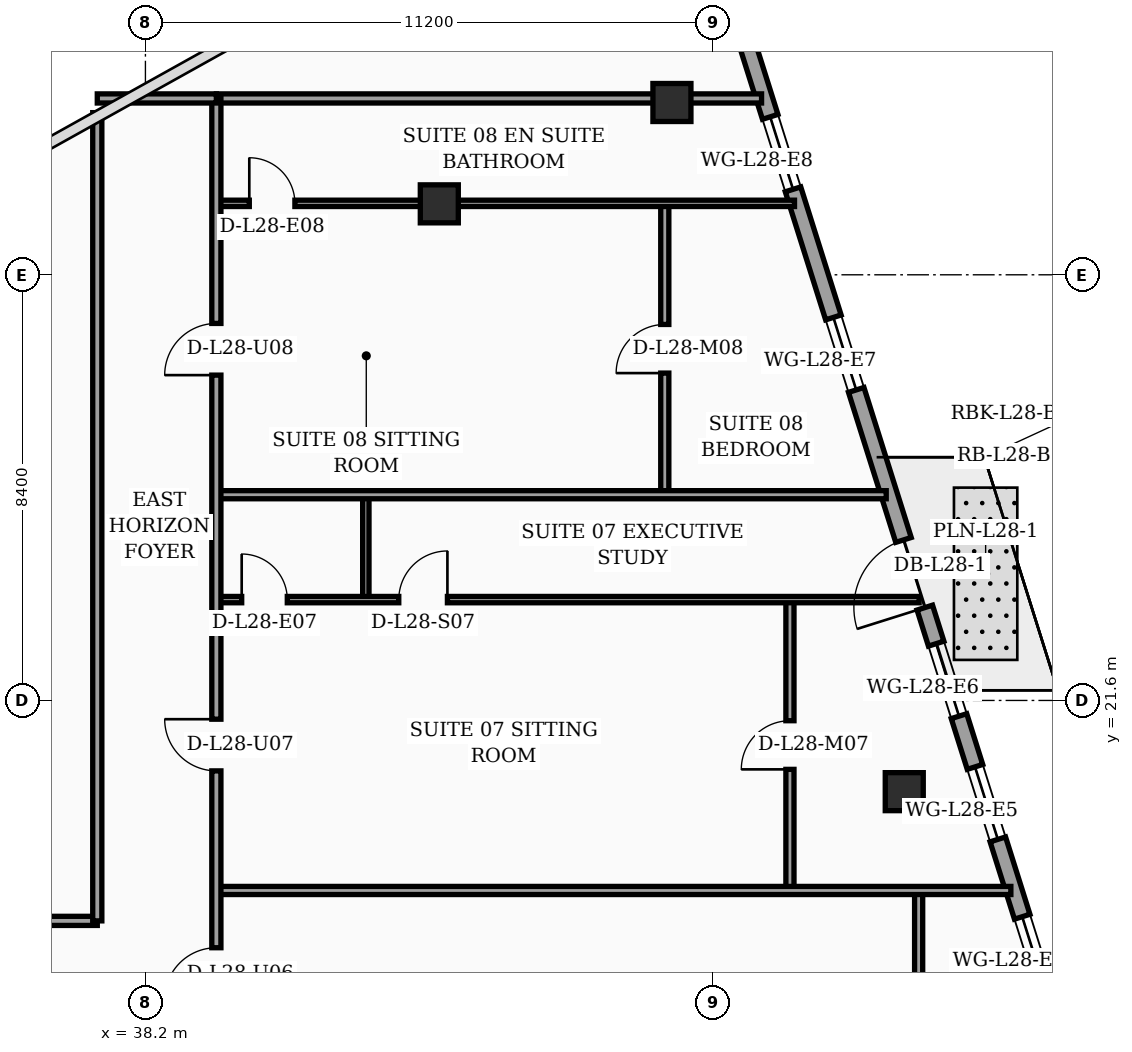
"""IFC4 building model, lengths in metres.
Left out: names, types, materials, properties, quantities, classifications, styles, units other than length and angle.
Written with IfcOpenShell. Run it as: python <this file> out.ifc"""

import sys

from ifc_helpers import new_model, si_unit, direction, frame, frame_2d, origin, origin_2d, place, context, subcontext, project, spatial, rectangle, hollow_rectangle, extrude, element, fill, save


model = new_model("IFC4")
c1 = context("Model", 3, precision=1e-05, world=origin(), true_north=direction((0.0, 1.0)))
c2 = subcontext(c1, "Body", "Model", "MODEL_VIEW")
j1 = project(units=[si_unit("LENGTHUNIT", "METRE"), si_unit("PLANEANGLEUNIT", "RADIAN")], contexts=[c1])
p1 = place(None, origin())
s1 = spatial("IfcSite", under=j1, at=p1, CompositionType="ELEMENT")
p2 = place(p1, origin())
s2 = spatial("IfcBuilding", under=s1, at=p2, CompositionType="ELEMENT")
p3 = place(p2, frame((0.0, 0.0, 116.4)))
s3 = spatial("IfcBuildingStorey", under=s2, at=p3, CompositionType="ELEMENT", Elevation=116.4)
for number, where, z_axis, x_axis in (
    (1, (44.0, 31.4, 0.0), (0.0, 0.0, 1.0), (1.0, 0.0, 0.0)),
    (2, (53.176, 19.8, 0.0), (0.0, 0.0, 1.0), (1.0, 0.0, 0.0)),
    (3, (48.591, 33.4, 0.0), (0.0, 0.0, 1.0), (1.0, 0.0, 0.0)),
):
    element("IfcColumn", number, at=place(p3, frame(where, z_axis=z_axis, x_axis=x_axis)), inside=s3, PredefinedType="COLUMN", context=c2, shape_type="SweptSolid", body=[
        extrude(hollow_rectangle(XDim=0.75, YDim=0.75, WallThickness=0.032, at=origin_2d()), origin(), (0.0, 0.0, 1.0), 3.56),
    ])
p4 = place(p3, frame((59.23, 5.505, 0.0), z_axis=(0.0, 0.0, 1.0), x_axis=(-0.300509063924, 0.953778958931, 0.0)))
e4 = element("IfcWall", 4, at=p4, inside=s3, PredefinedType="SOLIDWALL", context=c2, shape_type="SweptSolid", body=[
    extrude(rectangle(XDim=30.814, YDim=0.32, at=frame_2d((15.407, 0.0))), origin(), (0.0, 0.0, 1.0), 3.56),
])
p5 = place(p4, frame((18.796, 0.0, 0.0)))
e5 = element("IfcOpeningElement", 5, at=p5, cuts=e4, PredefinedType="OPENING", context=c2, shape_type="SweptSolid", body=[
    extrude(rectangle(XDim=1.4, YDim=2.25, at=frame_2d((0.7, 1.125))), frame((0.0, 0.17, 0.0), z_axis=(0.0, -1.0, 0.0), x_axis=(1.0, 0.0, 0.0)), (0.0, 0.0, 1.0), 0.34),
])
p6 = place(p4, frame((2.65, 0.0, 0.75)))
e6 = element("IfcOpeningElement", 6, at=p6, cuts=e4, PredefinedType="OPENING", context=c2, shape_type="SweptSolid", body=[
    extrude(rectangle(XDim=1.5, YDim=1.6, at=frame_2d((0.75, 0.8))), frame((0.0, 0.17, 0.0), z_axis=(0.0, -1.0, 0.0), x_axis=(1.0, 0.0, 0.0)), (0.0, 0.0, 1.0), 0.34),
])
p7 = place(p4, frame((4.7, 0.0, 0.75)))
e7 = element("IfcOpeningElement", 7, at=p7, cuts=e4, PredefinedType="OPENING", context=c2, shape_type="SweptSolid", body=[
    extrude(rectangle(XDim=1.5, YDim=1.6, at=frame_2d((0.75, 0.8))), frame((0.0, 0.17, 0.0), z_axis=(0.0, -1.0, 0.0), x_axis=(1.0, 0.0, 0.0)), (0.0, 0.0, 1.0), 0.34),
])
p8 = place(p4, frame((7.8, 0.0, 0.75)))
e8 = element("IfcOpeningElement", 8, at=p8, cuts=e4, PredefinedType="OPENING", context=c2, shape_type="SweptSolid", body=[
    extrude(rectangle(XDim=1.5, YDim=1.6, at=frame_2d((0.75, 0.8))), frame((0.0, 0.17, 0.0), z_axis=(0.0, -1.0, 0.0), x_axis=(1.0, 0.0, 0.0)), (0.0, 0.0, 1.0), 0.34),
])
p9 = place(p4, frame((10.9, 0.0, 0.75)))
e9 = element("IfcOpeningElement", 9, at=p9, cuts=e4, PredefinedType="OPENING", context=c2, shape_type="SweptSolid", body=[
    extrude(rectangle(XDim=1.5, YDim=1.6, at=frame_2d((0.75, 0.8))), frame((0.0, 0.17, 0.0), z_axis=(0.0, -1.0, 0.0), x_axis=(1.0, 0.0, 0.0)), (0.0, 0.0, 1.0), 0.34),
])
p10 = place(p4, frame((14.0, 0.0, 0.75)))
e10 = element("IfcOpeningElement", 10, at=p10, cuts=e4, PredefinedType="OPENING", context=c2, shape_type="SweptSolid", body=[
    extrude(rectangle(XDim=1.5, YDim=1.6, at=frame_2d((0.75, 0.8))), frame((0.0, 0.17, 0.0), z_axis=(0.0, -1.0, 0.0), x_axis=(1.0, 0.0, 0.0)), (0.0, 0.0, 1.0), 0.34),
])
p11 = place(p4, frame((16.55, 0.0, 0.75)))
e11 = element("IfcOpeningElement", 11, at=p11, cuts=e4, PredefinedType="OPENING", context=c2, shape_type="SweptSolid", body=[
    extrude(rectangle(XDim=1.5, YDim=1.6, at=frame_2d((0.75, 0.8))), frame((0.0, 0.17, 0.0), z_axis=(0.0, -1.0, 0.0), x_axis=(1.0, 0.0, 0.0)), (0.0, 0.0, 1.0), 0.34),
])
p12 = place(p4, frame((23.3, 0.0, 0.75)))
e12 = element("IfcOpeningElement", 12, at=p12, cuts=e4, PredefinedType="OPENING", context=c2, shape_type="SweptSolid", body=[
    extrude(rectangle(XDim=1.5, YDim=1.6, at=frame_2d((0.75, 0.8))), frame((0.0, 0.17, 0.0), z_axis=(0.0, -1.0, 0.0), x_axis=(1.0, 0.0, 0.0)), (0.0, 0.0, 1.0), 0.34),
])
p13 = place(p4, frame((27.45, 0.0, 0.75)))
e13 = element("IfcOpeningElement", 13, at=p13, cuts=e4, PredefinedType="OPENING", context=c2, shape_type="SweptSolid", body=[
    extrude(rectangle(XDim=1.5, YDim=1.6, at=frame_2d((0.75, 0.8))), frame((0.0, 0.17, 0.0), z_axis=(0.0, -1.0, 0.0), x_axis=(1.0, 0.0, 0.0)), (0.0, 0.0, 1.0), 0.34),
])
p14 = place(p3, frame((21.5, 17.25, 0.0), z_axis=(0.0, 0.0, 1.0), x_axis=(1.0, 0.0, 0.0)))
e14 = element("IfcWall", 14, at=p14, inside=s3, PredefinedType="PARTITIONING", context=c2, shape_type="SweptSolid", body=[
    extrude(rectangle(XDim=15.75, YDim=0.18, at=frame_2d((7.875, 0.0))), origin(), (0.0, 0.0, 1.0), 2.84),
])
p15 = place(p14, frame((0.95, 0.0, 0.0)))
e15 = element("IfcOpeningElement", 15, at=p15, cuts=e14, PredefinedType="OPENING", context=c2, shape_type="SweptSolid", body=[
    extrude(rectangle(XDim=1.02, YDim=2.2, at=frame_2d((0.51, 1.1))), frame((0.0, 0.1, 0.0), z_axis=(0.0, -1.0, 0.0), x_axis=(1.0, 0.0, 0.0)), (0.0, 0.0, 1.0), 0.2),
])
p16 = place(p14, frame((6.82, 0.0, 0.0)))
e16 = element("IfcOpeningElement", 16, at=p16, cuts=e14, PredefinedType="OPENING", context=c2, shape_type="SweptSolid", body=[
    extrude(rectangle(XDim=1.02, YDim=2.2, at=frame_2d((0.51, 1.1))), frame((0.0, 0.1, 0.0), z_axis=(0.0, -1.0, 0.0), x_axis=(1.0, 0.0, 0.0)), (0.0, 0.0, 1.0), 0.2),
])
p17 = place(p14, frame((11.38, 0.0, 0.0)))
e17 = element("IfcOpeningElement", 17, at=p17, cuts=e14, PredefinedType="OPENING", context=c2, shape_type="SweptSolid", body=[
    extrude(rectangle(XDim=1.02, YDim=2.2, at=frame_2d((0.51, 1.1))), frame((0.0, 0.1, 0.0), z_axis=(0.0, -1.0, 0.0), x_axis=(1.0, 0.0, 0.0)), (0.0, 0.0, 1.0), 0.2),
])
p18 = place(p3, frame((37.25, 17.25, 0.0), z_axis=(0.0, 0.0, 1.0), x_axis=(0.0, 1.0, 0.0)))
e18 = element("IfcWall", 18, at=p18, inside=s3, PredefinedType="PARTITIONING", context=c2, shape_type="SweptSolid", body=[
    extrude(rectangle(XDim=15.95, YDim=0.18, at=frame_2d((7.975, 0.0))), origin(), (0.0, 0.0, 1.0), 2.84),
])
p19 = place(p3, frame((53.46, 7.45, 0.0), z_axis=(0.0, 0.0, 1.0), x_axis=(0.0, 1.0, 0.0)))
e19 = element("IfcWall", 19, at=p19, inside=s3, PredefinedType="PARTITIONING", context=c2, shape_type="SweptSolid", body=[
    extrude(rectangle(XDim=10.4, YDim=0.16, at=frame_2d((5.2, 0.0))), origin(), (0.0, 0.0, 1.0), 3.04),
])
p20 = place(p19, frame((4.72, 0.0, 0.0)))
e20 = element("IfcOpeningElement", 20, at=p20, cuts=e19, PredefinedType="OPENING", context=c2, shape_type="SweptSolid", body=[
    extrude(rectangle(XDim=0.96, YDim=2.2, at=frame_2d((0.48, 1.1))), frame((0.0, 0.09, 0.0), z_axis=(0.0, -1.0, 0.0), x_axis=(1.0, 0.0, 0.0)), (0.0, 0.0, 1.0), 0.18),
])
p21 = place(p3, frame((42.55, 23.59, 0.0), z_axis=(0.0, 0.0, 1.0), x_axis=(0.0, 1.0, 0.0)))
e21 = element("IfcWall", 21, at=p21, inside=s3, PredefinedType="PARTITIONING", context=c2, shape_type="SweptSolid", body=[
    extrude(rectangle(XDim=2.07, YDim=0.125, at=frame_2d((1.035, 0.0))), origin(), (0.0, 0.0, 1.0), 3.19),
])
p22 = place(p3, frame((50.92, 17.85, 0.0), z_axis=(0.0, 0.0, 1.0), x_axis=(0.0, 1.0, 0.0)))
e22 = element("IfcWall", 22, at=p22, inside=s3, PredefinedType="PARTITIONING", context=c2, shape_type="SweptSolid", body=[
    extrude(rectangle(XDim=5.74, YDim=0.16, at=frame_2d((2.87, 0.0))), origin(), (0.0, 0.0, 1.0), 2.84),
])
p23 = place(p22, frame((2.39, 0.0, 0.0)))
e23 = element("IfcOpeningElement", 23, at=p23, cuts=e22, PredefinedType="OPENING", context=c2, shape_type="SweptSolid", body=[
    extrude(rectangle(XDim=0.96, YDim=2.2, at=frame_2d((0.48, 1.1))), frame((0.0, 0.09, 0.0), z_axis=(0.0, -1.0, 0.0), x_axis=(1.0, 0.0, 0.0)), (0.0, 0.0, 1.0), 0.18),
])
p24 = place(p3, frame((39.6, 23.59, 0.0), z_axis=(0.0, 0.0, 1.0), x_axis=(1.0, 0.0, 0.0)))
e24 = element("IfcWall", 24, at=p24, inside=s3, PredefinedType="PARTITIONING", context=c2, shape_type="SweptSolid", body=[
    extrude(rectangle(XDim=13.87, YDim=0.125, at=frame_2d((6.935, 0.0))), origin(), (0.0, 0.0, 1.0), 2.84),
])
p25 = place(p24, frame((0.5, 0.0, 0.0)))
e25 = element("IfcOpeningElement", 25, at=p25, cuts=e24, PredefinedType="OPENING", context=c2, shape_type="SweptSolid", body=[
    extrude(rectangle(XDim=0.9, YDim=2.15, at=frame_2d((0.45, 1.075))), frame((0.0, 0.073, 0.0), z_axis=(0.0, -1.0, 0.0), x_axis=(1.0, 0.0, 0.0)), (0.0, 0.0, 1.0), 0.145),
])
p26 = place(p24, frame((3.6, 0.0, 0.0)))
e26 = element("IfcOpeningElement", 26, at=p26, cuts=e24, PredefinedType="OPENING", context=c2, shape_type="SweptSolid", body=[
    extrude(rectangle(XDim=0.96, YDim=2.2, at=frame_2d((0.48, 1.1))), frame((0.0, 0.073, 0.0), z_axis=(0.0, -1.0, 0.0), x_axis=(1.0, 0.0, 0.0)), (0.0, 0.0, 1.0), 0.145),
])
p27 = place(p3, frame((48.45, 25.66, 0.0), z_axis=(0.0, 0.0, 1.0), x_axis=(0.0, 1.0, 0.0)))
e27 = element("IfcWall", 27, at=p27, inside=s3, PredefinedType="PARTITIONING", context=c2, shape_type="SweptSolid", body=[
    extrude(rectangle(XDim=5.75, YDim=0.16, at=frame_2d((2.875, 0.0))), origin(), (0.0, 0.0, 1.0), 3.56),
])
p28 = place(p27, frame((2.4, 0.0, 0.0)))
e28 = element("IfcOpeningElement", 28, at=p28, cuts=e27, PredefinedType="OPENING", context=c2, shape_type="SweptSolid", body=[
    extrude(rectangle(XDim=0.96, YDim=2.2, at=frame_2d((0.48, 1.1))), frame((0.0, 0.09, 0.0), z_axis=(0.0, -1.0, 0.0), x_axis=(1.0, 0.0, 0.0)), (0.0, 0.0, 1.0), 0.18),
])
p29 = place(p3, frame((39.6, 31.41, 0.0), z_axis=(0.0, 0.0, 1.0), x_axis=(1.0, 0.0, 0.0)))
e29 = element("IfcWall", 29, at=p29, inside=s3, PredefinedType="PARTITIONING", context=c2, shape_type="SweptSolid", body=[
    extrude(rectangle(XDim=11.41, YDim=0.125, at=frame_2d((5.705, 0.0))), origin(), (0.0, 0.0, 1.0), 2.84),
])
p30 = place(p29, frame((0.65, 0.0, 0.0)))
e30 = element("IfcOpeningElement", 30, at=p30, cuts=e29, PredefinedType="OPENING", context=c2, shape_type="SweptSolid", body=[
    extrude(rectangle(XDim=0.9, YDim=2.15, at=frame_2d((0.45, 1.075))), frame((0.0, 0.073, 0.0), z_axis=(0.0, -1.0, 0.0), x_axis=(1.0, 0.0, 0.0)), (0.0, 0.0, 1.0), 0.145),
])
p31 = place(p3, frame((39.6, 25.66, 0.0), z_axis=(0.0, 0.0, 1.0), x_axis=(1.0, 0.0, 0.0)))
e31 = element("IfcWall", 31, at=p31, inside=s3, PredefinedType="PARTITIONING", context=c2, shape_type="SweptSolid", body=[
    extrude(rectangle(XDim=13.22, YDim=0.16, at=frame_2d((6.61, 0.0))), origin(), (0.0, 0.0, 1.0), 2.84),
])
p32 = place(p3, frame((39.6, 17.85, 0.0), z_axis=(0.0, 0.0, 1.0), x_axis=(1.0, 0.0, 0.0)))
e32 = element("IfcWall", 32, at=p32, inside=s3, PredefinedType="PARTITIONING", context=c2, shape_type="SweptSolid", body=[
    extrude(rectangle(XDim=15.68, YDim=0.16, at=frame_2d((7.84, 0.0))), origin(), (0.0, 0.0, 1.0), 2.84),
])
p33 = place(p3, frame((39.6, 33.48, 0.0), z_axis=(0.0, 0.0, 1.0), x_axis=(1.0, 0.0, 0.0)))
e33 = element("IfcWall", 33, at=p33, inside=s3, PredefinedType="PARTITIONING", context=c2, shape_type="SweptSolid", body=[
    extrude(rectangle(XDim=10.76, YDim=0.18, at=frame_2d((5.38, 0.0))), origin(), (0.0, 0.0, 1.0), 2.84),
])
p34 = place(p3, frame((39.6, 2.44, 0.0), z_axis=(0.0, 0.0, 1.0), x_axis=(0.0, 1.0, 0.0)))
e34 = element("IfcWall", 34, at=p34, inside=s3, PredefinedType="PARTITIONING", context=c2, shape_type="SweptSolid", body=[
    extrude(rectangle(XDim=31.04, YDim=0.18, at=frame_2d((15.52, 0.0))), origin(), (0.0, 0.0, 1.0), 2.84),
])
p35 = place(p34, frame((13.26, 0.0, 0.0)))
e35 = element("IfcOpeningElement", 35, at=p35, cuts=e34, PredefinedType="OPENING", context=c2, shape_type="SweptSolid", body=[
    extrude(rectangle(XDim=1.02, YDim=2.2, at=frame_2d((0.51, 1.1))), frame((0.0, 0.1, 0.0), z_axis=(0.0, -1.0, 0.0), x_axis=(1.0, 0.0, 0.0)), (0.0, 0.0, 1.0), 0.2),
])
p36 = place(p34, frame((17.77, 0.0, 0.0)))
e36 = element("IfcOpeningElement", 36, at=p36, cuts=e34, PredefinedType="OPENING", context=c2, shape_type="SweptSolid", body=[
    extrude(rectangle(XDim=1.02, YDim=2.2, at=frame_2d((0.51, 1.1))), frame((0.0, 0.1, 0.0), z_axis=(0.0, -1.0, 0.0), x_axis=(1.0, 0.0, 0.0)), (0.0, 0.0, 1.0), 0.2),
])
p37 = place(p34, frame((25.58, 0.0, 0.0)))
e37 = element("IfcOpeningElement", 37, at=p37, cuts=e34, PredefinedType="OPENING", context=c2, shape_type="SweptSolid", body=[
    extrude(rectangle(XDim=1.02, YDim=2.2, at=frame_2d((0.51, 1.1))), frame((0.0, 0.1, 0.0), z_axis=(0.0, -1.0, 0.0), x_axis=(1.0, 0.0, 0.0)), (0.0, 0.0, 1.0), 0.2),
])
p38 = place(p3, frame((37.25, 33.48, 0.0), z_axis=(0.0, 0.0, 1.0), x_axis=(1.0, 0.0, 0.0)))
e38 = element("IfcWall", 38, at=p38, inside=s3, PredefinedType="PARTITIONING", context=c2, shape_type="SweptSolid", body=[
    extrude(rectangle(XDim=2.35, YDim=0.18, at=frame_2d((1.175, 0.0))), origin(), (0.0, 0.0, 1.0), 3.56),
])
p39 = place(p5, origin())
e39 = element("IfcDoor", 39, at=p39, inside=s3, OperationType="SINGLE_SWING_LEFT", PredefinedType="DOOR", context=c2, shape_type="SweptSolid", body=[
    extrude(rectangle(XDim=1.4, YDim=2.25, at=frame_2d((0.7, 1.125))), frame((0.0, 0.025, 0.0), z_axis=(0.0, -1.0, 0.0), x_axis=(1.0, 0.0, 0.0)), (0.0, 0.0, 1.0), 0.05),
])
fill(e5, e39)
p40 = place(p9, origin())
e40 = element("IfcWindow", 40, at=p40, inside=s3, PartitioningType="SINGLE_PANEL", PredefinedType="WINDOW", context=c2, shape_type="SweptSolid", body=[
    extrude(rectangle(XDim=1.5, YDim=1.6, at=frame_2d((0.75, 0.8))), frame((0.0, 0.03, 0.0), z_axis=(0.0, -1.0, 0.0), x_axis=(1.0, 0.0, 0.0)), (0.0, 0.0, 1.0), 0.06),
])
fill(e9, e40)
p41 = place(p10, origin())
e41 = element("IfcWindow", 41, at=p41, inside=s3, PartitioningType="SINGLE_PANEL", PredefinedType="WINDOW", context=c2, shape_type="SweptSolid", body=[
    extrude(rectangle(XDim=1.5, YDim=1.6, at=frame_2d((0.75, 0.8))), frame((0.0, 0.03, 0.0), z_axis=(0.0, -1.0, 0.0), x_axis=(1.0, 0.0, 0.0)), (0.0, 0.0, 1.0), 0.06),
])
fill(e10, e41)
p42 = place(p11, origin())
e42 = element("IfcWindow", 42, at=p42, inside=s3, PartitioningType="SINGLE_PANEL", PredefinedType="WINDOW", context=c2, shape_type="SweptSolid", body=[
    extrude(rectangle(XDim=1.5, YDim=1.6, at=frame_2d((0.75, 0.8))), frame((0.0, 0.03, 0.0), z_axis=(0.0, -1.0, 0.0), x_axis=(1.0, 0.0, 0.0)), (0.0, 0.0, 1.0), 0.06),
])
fill(e11, e42)
p43 = place(p12, origin())
e43 = element("IfcWindow", 43, at=p43, inside=s3, PartitioningType="SINGLE_PANEL", PredefinedType="WINDOW", context=c2, shape_type="SweptSolid", body=[
    extrude(rectangle(XDim=1.5, YDim=1.6, at=frame_2d((0.75, 0.8))), frame((0.0, 0.03, 0.0), z_axis=(0.0, -1.0, 0.0), x_axis=(1.0, 0.0, 0.0)), (0.0, 0.0, 1.0), 0.06),
])
fill(e12, e43)
p44 = place(p13, origin())
e44 = element("IfcWindow", 44, at=p44, inside=s3, PartitioningType="SINGLE_PANEL", PredefinedType="WINDOW", context=c2, shape_type="SweptSolid", body=[
    extrude(rectangle(XDim=1.5, YDim=1.6, at=frame_2d((0.75, 0.8))), frame((0.0, 0.03, 0.0), z_axis=(0.0, -1.0, 0.0), x_axis=(1.0, 0.0, 0.0)), (0.0, 0.0, 1.0), 0.06),
])
fill(e13, e44)
p45 = place(p23, origin())
e45 = element("IfcDoor", 45, at=p45, inside=s3, OperationType="SINGLE_SWING_LEFT", PredefinedType="DOOR", context=c2, shape_type="SweptSolid", body=[
    extrude(rectangle(XDim=0.96, YDim=2.2, at=frame_2d((0.48, 1.1))), frame((0.0, 0.025, 0.0), z_axis=(0.0, -1.0, 0.0), x_axis=(1.0, 0.0, 0.0)), (0.0, 0.0, 1.0), 0.05),
])
fill(e23, e45)
p46 = place(p25, origin())
e46 = element("IfcDoor", 46, at=p46, inside=s3, OperationType="SINGLE_SWING_LEFT", PredefinedType="DOOR", context=c2, shape_type="SweptSolid", body=[
    extrude(rectangle(XDim=0.9, YDim=2.15, at=frame_2d((0.45, 1.075))), frame((0.0, 0.025, 0.0), z_axis=(0.0, -1.0, 0.0), x_axis=(1.0, 0.0, 0.0)), (0.0, 0.0, 1.0), 0.05),
])
fill(e25, e46)
p47 = place(p26, origin())
e47 = element("IfcDoor", 47, at=p47, inside=s3, OperationType="SINGLE_SWING_RIGHT", PredefinedType="DOOR", context=c2, shape_type="SweptSolid", body=[
    extrude(rectangle(XDim=0.96, YDim=2.2, at=frame_2d((0.48, 1.1))), frame((0.0, 0.025, 0.0), z_axis=(0.0, -1.0, 0.0), x_axis=(1.0, 0.0, 0.0)), (0.0, 0.0, 1.0), 0.05),
])
fill(e26, e47)
p48 = place(p28, origin())
e48 = element("IfcDoor", 48, at=p48, inside=s3, OperationType="SINGLE_SWING_LEFT", PredefinedType="DOOR", context=c2, shape_type="SweptSolid", body=[
    extrude(rectangle(XDim=0.96, YDim=2.2, at=frame_2d((0.48, 1.1))), frame((0.0, 0.025, 0.0), z_axis=(0.0, -1.0, 0.0), x_axis=(1.0, 0.0, 0.0)), (0.0, 0.0, 1.0), 0.05),
])
fill(e28, e48)
p49 = place(p30, origin())
e49 = element("IfcDoor", 49, at=p49, inside=s3, OperationType="SINGLE_SWING_LEFT", PredefinedType="DOOR", context=c2, shape_type="SweptSolid", body=[
    extrude(rectangle(XDim=0.9, YDim=2.15, at=frame_2d((0.45, 1.075))), frame((0.0, 0.025, 0.0), z_axis=(0.0, -1.0, 0.0), x_axis=(1.0, 0.0, 0.0)), (0.0, 0.0, 1.0), 0.05),
])
fill(e30, e49)
p50 = place(p35, origin())
e50 = element("IfcDoor", 50, at=p50, inside=s3, OperationType="SINGLE_SWING_LEFT", PredefinedType="DOOR", context=c2, shape_type="SweptSolid", body=[
    extrude(rectangle(XDim=1.02, YDim=2.2, at=frame_2d((0.51, 1.1))), frame((0.0, 0.025, 0.0), z_axis=(0.0, -1.0, 0.0), x_axis=(1.0, 0.0, 0.0)), (0.0, 0.0, 1.0), 0.05),
])
fill(e35, e50)
p51 = place(p36, origin())
e51 = element("IfcDoor", 51, at=p51, inside=s3, OperationType="SINGLE_SWING_RIGHT", PredefinedType="DOOR", context=c2, shape_type="SweptSolid", body=[
    extrude(rectangle(XDim=1.02, YDim=2.2, at=frame_2d((0.51, 1.1))), frame((0.0, 0.025, 0.0), z_axis=(0.0, -1.0, 0.0), x_axis=(1.0, 0.0, 0.0)), (0.0, 0.0, 1.0), 0.05),
])
fill(e36, e51)
p52 = place(p37, origin())
e52 = element("IfcDoor", 52, at=p52, inside=s3, OperationType="SINGLE_SWING_LEFT", PredefinedType="DOOR", context=c2, shape_type="SweptSolid", body=[
    extrude(rectangle(XDim=1.02, YDim=2.2, at=frame_2d((0.51, 1.1))), frame((0.0, 0.025, 0.0), z_axis=(0.0, -1.0, 0.0), x_axis=(1.0, 0.0, 0.0)), (0.0, 0.0, 1.0), 0.05),
])
fill(e37, e52)
save(model, sys.argv[1])
